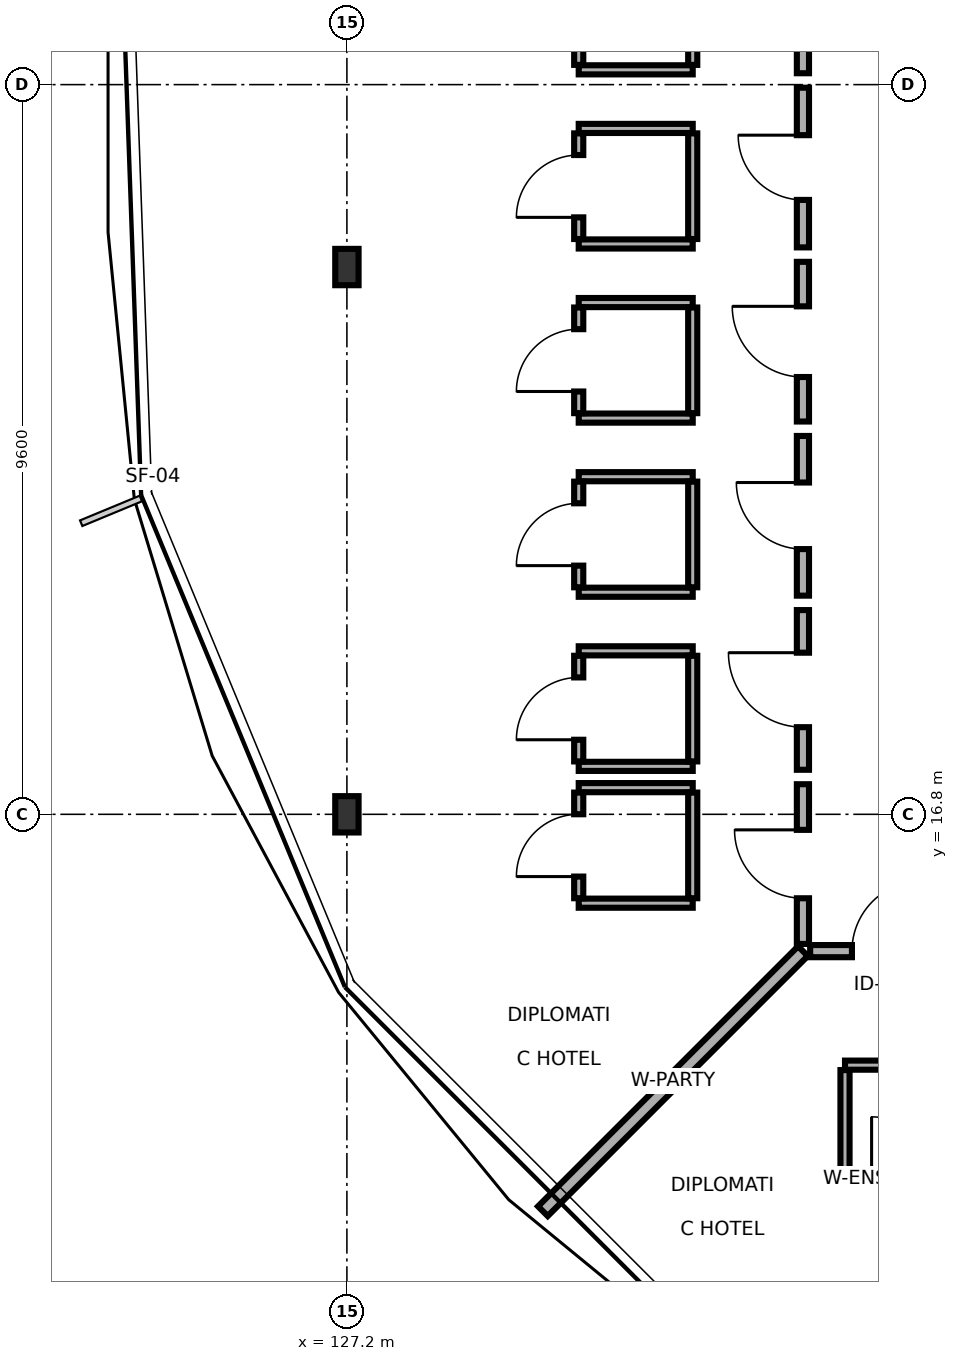
"""IFC4 building model, lengths in metres.
Left out: names, types, materials, properties, quantities, classifications, styles, units other than length and angle.
Written with IfcOpenShell. Run it as: python <this file> out.ifc"""

import sys

from ifc_helpers import new_model, si_unit, direction, frame, frame_2d, origin, origin_2d, place, context, subcontext, project, spatial, rectangle, i_section, extrude, element, fill, save


model = new_model("IFC4")
c1 = context("Model", 3, precision=1e-05, world=origin(), true_north=direction((0.0, 1.0)))
c2 = subcontext(c1, "Body", "Model", "MODEL_VIEW")
j1 = project(units=[si_unit("LENGTHUNIT", "METRE"), si_unit("PLANEANGLEUNIT", "RADIAN")], contexts=[c1])
p1 = place(None, origin())
s1 = spatial("IfcSite", under=j1, at=p1, CompositionType="ELEMENT")
p2 = place(p1, origin())
s2 = spatial("IfcBuilding", under=s1, at=p2, CompositionType="ELEMENT")
p3 = place(p2, frame((0.0, 0.0, 18.1)))
s3 = spatial("IfcBuildingStorey", under=s2, at=p3, CompositionType="ELEMENT", Elevation=18.1)
for number, where, z_axis, x_axis in (
    (1, (127.2, 24.0, 0.0), (0.0, 0.0, 1.0), (1.0, 0.0, 0.0)),
    (2, (127.2, 16.8, 0.0), (0.0, 0.0, 1.0), (1.0, 0.0, 0.0)),
):
    element("IfcColumn", number, at=place(p3, frame(where, z_axis=z_axis, x_axis=x_axis)), inside=s3, PredefinedType="COLUMN", context=c2, shape_type="SweptSolid", body=[
        extrude(i_section(OverallWidth=0.307, OverallDepth=0.478, WebThickness=0.021, FlangeThickness=0.04, FilletRadius=0.027, at=origin_2d()), origin(), (0.0, 0.0, 1.0), 3.4),
    ])
p4 = place(p3, frame((133.295, 15.0, 0.0), z_axis=(0.0, 0.0, 1.0), x_axis=(1.0, 0.0, 0.0)))
e3 = element("IfcWall", 3, at=p4, inside=s3, PredefinedType="PARTITIONING", context=c2, shape_type="SweptSolid", body=[
    extrude(rectangle(XDim=2.024, YDim=0.16, at=frame_2d((1.012, 0.0))), origin(), (0.0, 0.0, 1.0), 3.21),
])
p5 = place(p4, frame((0.55, 0.0, 0.0)))
e4 = element("IfcOpeningElement", 4, at=p5, cuts=e3, PredefinedType="OPENING", context=c2, shape_type="SweptSolid", body=[
    extrude(rectangle(XDim=0.924, YDim=2.16, at=frame_2d((0.462, 1.08))), frame((0.0, 0.09, 0.0), z_axis=(0.0, -1.0, 0.0), x_axis=(1.0, 0.0, 0.0)), (0.0, 0.0, 1.0), 0.18),
])
p6 = place(p3, frame((133.754, 12.0, 0.0), z_axis=(0.0, 0.0, 1.0), x_axis=(1.0, 0.0, 0.0)))
e5 = element("IfcWall", 5, at=p6, inside=s3, PredefinedType="PARTITIONING", context=c2, shape_type="SweptSolid", body=[
    extrude(rectangle(XDim=1.52, YDim=0.12, at=frame_2d((0.76, 0.0))), origin(), (0.0, 0.0, 1.0), 2.745),
])
p7 = place(p6, frame((0.35, 0.0, 0.0)))
e6 = element("IfcOpeningElement", 6, at=p7, cuts=e5, PredefinedType="OPENING", context=c2, shape_type="SweptSolid", body=[
    extrude(rectangle(XDim=0.82, YDim=2.08, at=frame_2d((0.41, 1.04))), frame((0.0, 0.07, 0.0), z_axis=(0.0, -1.0, 0.0), x_axis=(1.0, 0.0, 0.0)), (0.0, 0.0, 1.0), 0.14),
])
p8 = place(p3, frame((133.754, 13.5, 0.0), z_axis=(0.0, 0.0, 1.0), x_axis=(1.0, 0.0, 0.0)))
e7 = element("IfcWall", 7, at=p8, inside=s3, PredefinedType="PARTITIONING", context=c2, shape_type="SweptSolid", body=[
    extrude(rectangle(XDim=1.52, YDim=0.12, at=frame_2d((0.76, 0.0))), origin(), (0.0, 0.0, 1.0), 3.21),
])
p9 = place(p3, frame((133.754, 12.065, 0.0), z_axis=(0.0, 0.0, 1.0), x_axis=(0.0, 1.0, 0.0)))
e8 = element("IfcWall", 8, at=p9, inside=s3, PredefinedType="PARTITIONING", context=c2, shape_type="SweptSolid", body=[
    extrude(rectangle(XDim=1.37, YDim=0.12, at=frame_2d((0.685, 0.0))), origin(), (0.0, 0.0, 1.0), 3.21),
])
p10 = place(p3, frame((133.2, 15.0, 0.0), z_axis=(0.0, 0.0, 1.0), x_axis=(-0.707106781187, -0.707106781187, 0.0)))
e9 = element("IfcWall", 9, at=p10, inside=s3, PredefinedType="PARTITIONING", context=c2, shape_type="SweptSolid", body=[
    extrude(rectangle(XDim=4.839, YDim=0.18, at=frame_2d((2.419, 0.0))), origin(), (0.0, 0.0, 1.0), 2.755),
])
p11 = place(p3, frame((133.2, 26.55, 0.0), z_axis=(0.0, 0.0, 1.0), x_axis=(0.0, 1.0, 0.0)))
e10 = element("IfcWall", 10, at=p11, inside=s3, PredefinedType="PARTITIONING", context=c2, shape_type="SweptSolid", body=[
    extrude(rectangle(XDim=2.101, YDim=0.16, at=frame_2d((1.05, 0.0))), origin(), (0.0, 0.0, 1.0), 3.21),
])
p12 = place(p11, frame((0.61, 0.0, 0.0)))
e11 = element("IfcOpeningElement", 11, at=p12, cuts=e10, PredefinedType="OPENING", context=c2, shape_type="SweptSolid", body=[
    extrude(rectangle(XDim=0.88, YDim=2.05, at=frame_2d((0.44, 1.025))), frame((0.0, 0.09, 0.0), z_axis=(0.0, -1.0, 0.0), x_axis=(1.0, 0.0, 0.0)), (0.0, 0.0, 1.0), 0.18),
])
p13 = place(p3, frame((130.25, 26.594, 0.0), z_axis=(0.0, 0.0, 1.0), x_axis=(1.0, 0.0, 0.0)))
e12 = element("IfcWall", 12, at=p13, inside=s3, PredefinedType="PARTITIONING", context=c2, shape_type="SweptSolid", body=[
    extrude(rectangle(XDim=1.5, YDim=0.12, at=frame_2d((0.75, 0.0))), origin(), (0.0, 0.0, 1.0), 3.21),
])
p14 = place(p3, frame((130.25, 26.66, 0.0), z_axis=(0.0, 0.0, 1.0), x_axis=(0.0, 1.0, 0.0)))
e13 = element("IfcWall", 13, at=p14, inside=s3, PredefinedType="PARTITIONING", context=c2, shape_type="SweptSolid", body=[
    extrude(rectangle(XDim=1.39, YDim=0.12, at=frame_2d((0.695, 0.0))), origin(), (0.0, 0.0, 1.0), 3.21),
])
p15 = place(p14, frame((0.285, 0.0, 0.0)))
e14 = element("IfcOpeningElement", 14, at=p15, cuts=e13, PredefinedType="OPENING", context=c2, shape_type="SweptSolid", body=[
    extrude(rectangle(XDim=0.82, YDim=2.08, at=frame_2d((0.41, 1.04))), frame((0.0, 0.07, 0.0), z_axis=(0.0, -1.0, 0.0), x_axis=(1.0, 0.0, 0.0)), (0.0, 0.0, 1.0), 0.14),
])
p16 = place(p3, frame((131.75, 26.66, 0.0), z_axis=(0.0, 0.0, 1.0), x_axis=(0.0, 1.0, 0.0)))
e15 = element("IfcWall", 15, at=p16, inside=s3, PredefinedType="PARTITIONING", context=c2, shape_type="SweptSolid", body=[
    extrude(rectangle(XDim=1.39, YDim=0.12, at=frame_2d((0.695, 0.0))), origin(), (0.0, 0.0, 1.0), 3.21),
])
p17 = place(p3, frame((133.2, 24.259, 0.0), z_axis=(0.0, 0.0, 1.0), x_axis=(0.0, 1.0, 0.0)))
e16 = element("IfcWall", 16, at=p17, inside=s3, PredefinedType="PARTITIONING", context=c2, shape_type="SweptSolid", body=[
    extrude(rectangle(XDim=2.101, YDim=0.16, at=frame_2d((1.051, 0.0))), origin(), (0.0, 0.0, 1.0), 3.21),
])
p18 = place(p17, frame((0.625, 0.0, 0.0)))
e17 = element("IfcOpeningElement", 17, at=p18, cuts=e16, PredefinedType="OPENING", context=c2, shape_type="SweptSolid", body=[
    extrude(rectangle(XDim=0.852, YDim=2.1, at=frame_2d((0.426, 1.05))), frame((0.0, 0.09, 0.0), z_axis=(0.0, -1.0, 0.0), x_axis=(1.0, 0.0, 0.0)), (0.0, 0.0, 1.0), 0.18),
])
for number, where, z_axis, x_axis in (
    (18, (130.25, 24.304, 0.0), (0.0, 0.0, 1.0), (1.0, 0.0, 0.0)),
    (19, (130.25, 25.823, 0.0), (0.0, 0.0, 1.0), (1.0, 0.0, 0.0)),
):
    element("IfcWall", number, at=place(p3, frame(where, z_axis=z_axis, x_axis=x_axis)), inside=s3, PredefinedType="PARTITIONING", context=c2, shape_type="SweptSolid", body=[
        extrude(rectangle(XDim=1.5, YDim=0.12, at=frame_2d((0.75, 0.0))), origin(), (0.0, 0.0, 1.0), 3.21),
    ])
p19 = place(p3, frame((130.25, 24.369, 0.0), z_axis=(0.0, 0.0, 1.0), x_axis=(0.0, 1.0, 0.0)))
e20 = element("IfcWall", 20, at=p19, inside=s3, PredefinedType="PARTITIONING", context=c2, shape_type="SweptSolid", body=[
    extrude(rectangle(XDim=1.39, YDim=0.12, at=frame_2d((0.695, 0.0))), origin(), (0.0, 0.0, 1.0), 3.21),
])
p20 = place(p19, frame((0.285, 0.0, 0.0)))
e21 = element("IfcOpeningElement", 21, at=p20, cuts=e20, PredefinedType="OPENING", context=c2, shape_type="SweptSolid", body=[
    extrude(rectangle(XDim=0.82, YDim=2.08, at=frame_2d((0.41, 1.04))), frame((0.0, 0.07, 0.0), z_axis=(0.0, -1.0, 0.0), x_axis=(1.0, 0.0, 0.0)), (0.0, 0.0, 1.0), 0.14),
])
p21 = place(p3, frame((131.75, 24.369, 0.0), z_axis=(0.0, 0.0, 1.0), x_axis=(0.0, 1.0, 0.0)))
e22 = element("IfcWall", 22, at=p21, inside=s3, PredefinedType="PARTITIONING", context=c2, shape_type="SweptSolid", body=[
    extrude(rectangle(XDim=1.39, YDim=0.12, at=frame_2d((0.695, 0.0))), origin(), (0.0, 0.0, 1.0), 3.21),
])
p22 = place(p3, frame((133.2, 21.968, 0.0), z_axis=(0.0, 0.0, 1.0), x_axis=(0.0, 1.0, 0.0)))
e23 = element("IfcWall", 23, at=p22, inside=s3, PredefinedType="PARTITIONING", context=c2, shape_type="SweptSolid", body=[
    extrude(rectangle(XDim=2.101, YDim=0.16, at=frame_2d((1.05, 0.0))), origin(), (0.0, 0.0, 1.0), 2.745),
])
p23 = place(p22, frame((0.585, 0.0, 0.0)))
e24 = element("IfcOpeningElement", 24, at=p23, cuts=e23, PredefinedType="OPENING", context=c2, shape_type="SweptSolid", body=[
    extrude(rectangle(XDim=0.93, YDim=2.05, at=frame_2d((0.465, 1.025))), frame((0.0, 0.09, 0.0), z_axis=(0.0, -1.0, 0.0), x_axis=(1.0, 0.0, 0.0)), (0.0, 0.0, 1.0), 0.18),
])
for number, where, z_axis, x_axis in (
    (25, (130.25, 22.013, 0.0), (0.0, 0.0, 1.0), (1.0, 0.0, 0.0)),
    (26, (130.25, 23.533, 0.0), (0.0, 0.0, 1.0), (1.0, 0.0, 0.0)),
):
    element("IfcWall", number, at=place(p3, frame(where, z_axis=z_axis, x_axis=x_axis)), inside=s3, PredefinedType="PARTITIONING", context=c2, shape_type="SweptSolid", body=[
        extrude(rectangle(XDim=1.5, YDim=0.12, at=frame_2d((0.75, 0.0))), origin(), (0.0, 0.0, 1.0), 3.21),
    ])
p24 = place(p3, frame((130.25, 22.078, 0.0), z_axis=(0.0, 0.0, 1.0), x_axis=(0.0, 1.0, 0.0)))
e27 = element("IfcWall", 27, at=p24, inside=s3, PredefinedType="PARTITIONING", context=c2, shape_type="SweptSolid", body=[
    extrude(rectangle(XDim=1.39, YDim=0.12, at=frame_2d((0.695, 0.0))), origin(), (0.0, 0.0, 1.0), 3.21),
])
p25 = place(p24, frame((0.285, 0.0, 0.0)))
e28 = element("IfcOpeningElement", 28, at=p25, cuts=e27, PredefinedType="OPENING", context=c2, shape_type="SweptSolid", body=[
    extrude(rectangle(XDim=0.82, YDim=2.08, at=frame_2d((0.41, 1.04))), frame((0.0, 0.07, 0.0), z_axis=(0.0, -1.0, 0.0), x_axis=(1.0, 0.0, 0.0)), (0.0, 0.0, 1.0), 0.14),
])
p26 = place(p3, frame((131.75, 22.078, 0.0), z_axis=(0.0, 0.0, 1.0), x_axis=(0.0, 1.0, 0.0)))
e29 = element("IfcWall", 29, at=p26, inside=s3, PredefinedType="PARTITIONING", context=c2, shape_type="SweptSolid", body=[
    extrude(rectangle(XDim=1.39, YDim=0.12, at=frame_2d((0.695, 0.0))), origin(), (0.0, 0.0, 1.0), 3.21),
])
p27 = place(p3, frame((133.2, 19.677, 0.0), z_axis=(0.0, 0.0, 1.0), x_axis=(0.0, 1.0, 0.0)))
e30 = element("IfcWall", 30, at=p27, inside=s3, PredefinedType="PARTITIONING", context=c2, shape_type="SweptSolid", body=[
    extrude(rectangle(XDim=2.101, YDim=0.16, at=frame_2d((1.05, 0.0))), origin(), (0.0, 0.0, 1.0), 3.21),
])
p28 = place(p27, frame((0.612, 0.0, 0.0)))
e31 = element("IfcOpeningElement", 31, at=p28, cuts=e30, PredefinedType="OPENING", context=c2, shape_type="SweptSolid", body=[
    extrude(rectangle(XDim=0.876, YDim=2.16, at=frame_2d((0.438, 1.08))), frame((0.0, 0.09, 0.0), z_axis=(0.0, -1.0, 0.0), x_axis=(1.0, 0.0, 0.0)), (0.0, 0.0, 1.0), 0.18),
])
for number, where, z_axis, x_axis in (
    (32, (130.25, 19.722, 0.0), (0.0, 0.0, 1.0), (1.0, 0.0, 0.0)),
    (33, (130.25, 21.242, 0.0), (0.0, 0.0, 1.0), (1.0, 0.0, 0.0)),
):
    element("IfcWall", number, at=place(p3, frame(where, z_axis=z_axis, x_axis=x_axis)), inside=s3, PredefinedType="PARTITIONING", context=c2, shape_type="SweptSolid", body=[
        extrude(rectangle(XDim=1.5, YDim=0.12, at=frame_2d((0.75, 0.0))), origin(), (0.0, 0.0, 1.0), 3.21),
    ])
p29 = place(p3, frame((130.25, 19.787, 0.0), z_axis=(0.0, 0.0, 1.0), x_axis=(0.0, 1.0, 0.0)))
e34 = element("IfcWall", 34, at=p29, inside=s3, PredefinedType="PARTITIONING", context=c2, shape_type="SweptSolid", body=[
    extrude(rectangle(XDim=1.39, YDim=0.12, at=frame_2d((0.695, 0.0))), origin(), (0.0, 0.0, 1.0), 3.21),
])
p30 = place(p29, frame((0.285, 0.0, 0.0)))
e35 = element("IfcOpeningElement", 35, at=p30, cuts=e34, PredefinedType="OPENING", context=c2, shape_type="SweptSolid", body=[
    extrude(rectangle(XDim=0.82, YDim=2.08, at=frame_2d((0.41, 1.04))), frame((0.0, 0.07, 0.0), z_axis=(0.0, -1.0, 0.0), x_axis=(1.0, 0.0, 0.0)), (0.0, 0.0, 1.0), 0.14),
])
p31 = place(p3, frame((131.75, 19.787, 0.0), z_axis=(0.0, 0.0, 1.0), x_axis=(0.0, 1.0, 0.0)))
e36 = element("IfcWall", 36, at=p31, inside=s3, PredefinedType="PARTITIONING", context=c2, shape_type="SweptSolid", body=[
    extrude(rectangle(XDim=1.39, YDim=0.12, at=frame_2d((0.695, 0.0))), origin(), (0.0, 0.0, 1.0), 3.21),
])
p32 = place(p3, frame((133.2, 17.386, 0.0), z_axis=(0.0, 0.0, 1.0), x_axis=(0.0, 1.0, 0.0)))
e37 = element("IfcWall", 37, at=p32, inside=s3, PredefinedType="PARTITIONING", context=c2, shape_type="SweptSolid", body=[
    extrude(rectangle(XDim=2.101, YDim=0.16, at=frame_2d((1.05, 0.0))), origin(), (0.0, 0.0, 1.0), 3.21),
])
p33 = place(p32, frame((0.56, 0.0, 0.0)))
e38 = element("IfcOpeningElement", 38, at=p33, cuts=e37, PredefinedType="OPENING", context=c2, shape_type="SweptSolid", body=[
    extrude(rectangle(XDim=0.98, YDim=2.05, at=frame_2d((0.49, 1.025))), frame((0.0, 0.09, 0.0), z_axis=(0.0, -1.0, 0.0), x_axis=(1.0, 0.0, 0.0)), (0.0, 0.0, 1.0), 0.18),
])
for number, where, z_axis, x_axis in (
    (39, (130.25, 17.431, 0.0), (0.0, 0.0, 1.0), (1.0, 0.0, 0.0)),
    (40, (130.25, 18.951, 0.0), (0.0, 0.0, 1.0), (1.0, 0.0, 0.0)),
):
    element("IfcWall", number, at=place(p3, frame(where, z_axis=z_axis, x_axis=x_axis)), inside=s3, PredefinedType="PARTITIONING", context=c2, shape_type="SweptSolid", body=[
        extrude(rectangle(XDim=1.5, YDim=0.12, at=frame_2d((0.75, 0.0))), origin(), (0.0, 0.0, 1.0), 3.21),
    ])
p34 = place(p3, frame((130.25, 17.496, 0.0), z_axis=(0.0, 0.0, 1.0), x_axis=(0.0, 1.0, 0.0)))
e41 = element("IfcWall", 41, at=p34, inside=s3, PredefinedType="PARTITIONING", context=c2, shape_type="SweptSolid", body=[
    extrude(rectangle(XDim=1.39, YDim=0.12, at=frame_2d((0.695, 0.0))), origin(), (0.0, 0.0, 1.0), 3.21),
])
p35 = place(p34, frame((0.285, 0.0, 0.0)))
e42 = element("IfcOpeningElement", 42, at=p35, cuts=e41, PredefinedType="OPENING", context=c2, shape_type="SweptSolid", body=[
    extrude(rectangle(XDim=0.82, YDim=2.08, at=frame_2d((0.41, 1.04))), frame((0.0, 0.07, 0.0), z_axis=(0.0, -1.0, 0.0), x_axis=(1.0, 0.0, 0.0)), (0.0, 0.0, 1.0), 0.14),
])
p36 = place(p3, frame((131.75, 17.496, 0.0), z_axis=(0.0, 0.0, 1.0), x_axis=(0.0, 1.0, 0.0)))
e43 = element("IfcWall", 43, at=p36, inside=s3, PredefinedType="PARTITIONING", context=c2, shape_type="SweptSolid", body=[
    extrude(rectangle(XDim=1.39, YDim=0.12, at=frame_2d((0.695, 0.0))), origin(), (0.0, 0.0, 1.0), 3.21),
])
p37 = place(p3, frame((133.2, 15.095, 0.0), z_axis=(0.0, 0.0, 1.0), x_axis=(0.0, 1.0, 0.0)))
e44 = element("IfcWall", 44, at=p37, inside=s3, PredefinedType="PARTITIONING", context=c2, shape_type="SweptSolid", body=[
    extrude(rectangle(XDim=2.101, YDim=0.16, at=frame_2d((1.05, 0.0))), origin(), (0.0, 0.0, 1.0), 2.745),
])
p38 = place(p37, frame((0.601, 0.0, 0.0)))
e45 = element("IfcOpeningElement", 45, at=p38, cuts=e44, PredefinedType="OPENING", context=c2, shape_type="SweptSolid", body=[
    extrude(rectangle(XDim=0.9, YDim=2.1, at=frame_2d((0.45, 1.05))), frame((0.0, 0.09, 0.0), z_axis=(0.0, -1.0, 0.0), x_axis=(1.0, 0.0, 0.0)), (0.0, 0.0, 1.0), 0.18),
])
for number, where, z_axis, x_axis in (
    (46, (130.25, 15.631, 0.0), (0.0, 0.0, 1.0), (1.0, 0.0, 0.0)),
    (47, (130.25, 17.151, 0.0), (0.0, 0.0, 1.0), (1.0, 0.0, 0.0)),
):
    element("IfcWall", number, at=place(p3, frame(where, z_axis=z_axis, x_axis=x_axis)), inside=s3, PredefinedType="PARTITIONING", context=c2, shape_type="SweptSolid", body=[
        extrude(rectangle(XDim=1.5, YDim=0.12, at=frame_2d((0.75, 0.0))), origin(), (0.0, 0.0, 1.0), 3.21),
    ])
p39 = place(p3, frame((130.25, 15.696, 0.0), z_axis=(0.0, 0.0, 1.0), x_axis=(0.0, 1.0, 0.0)))
e48 = element("IfcWall", 48, at=p39, inside=s3, PredefinedType="PARTITIONING", context=c2, shape_type="SweptSolid", body=[
    extrude(rectangle(XDim=1.39, YDim=0.12, at=frame_2d((0.695, 0.0))), origin(), (0.0, 0.0, 1.0), 2.745),
])
p40 = place(p39, frame((0.285, 0.0, 0.0)))
e49 = element("IfcOpeningElement", 49, at=p40, cuts=e48, PredefinedType="OPENING", context=c2, shape_type="SweptSolid", body=[
    extrude(rectangle(XDim=0.82, YDim=2.08, at=frame_2d((0.41, 1.04))), frame((0.0, 0.07, 0.0), z_axis=(0.0, -1.0, 0.0), x_axis=(1.0, 0.0, 0.0)), (0.0, 0.0, 1.0), 0.14),
])
p41 = place(p3, frame((131.75, 15.696, 0.0), z_axis=(0.0, 0.0, 1.0), x_axis=(0.0, 1.0, 0.0)))
e50 = element("IfcWall", 50, at=p41, inside=s3, PredefinedType="PARTITIONING", context=c2, shape_type="SweptSolid", body=[
    extrude(rectangle(XDim=1.39, YDim=0.12, at=frame_2d((0.695, 0.0))), origin(), (0.0, 0.0, 1.0), 2.745),
])
p42 = place(p5, origin())
e51 = element("IfcDoor", 51, at=p42, inside=s3, OperationType="SINGLE_SWING_RIGHT", PredefinedType="DOOR", context=c2, shape_type="SweptSolid", body=[
    extrude(rectangle(XDim=0.924, YDim=2.16, at=frame_2d((0.462, 1.08))), frame((0.0, 0.025, 0.0), z_axis=(0.0, -1.0, 0.0), x_axis=(1.0, 0.0, 0.0)), (0.0, 0.0, 1.0), 0.05),
])
fill(e4, e51)
p43 = place(p7, origin())
e52 = element("IfcDoor", 52, at=p43, inside=s3, OperationType="SINGLE_SWING_LEFT", PredefinedType="DOOR", context=c2, shape_type="SweptSolid", body=[
    extrude(rectangle(XDim=0.82, YDim=2.08, at=frame_2d((0.41, 1.04))), frame((0.0, 0.025, 0.0), z_axis=(0.0, -1.0, 0.0), x_axis=(1.0, 0.0, 0.0)), (0.0, 0.0, 1.0), 0.05),
])
fill(e6, e52)
p44 = place(p18, origin())
e53 = element("IfcDoor", 53, at=p44, inside=s3, OperationType="SINGLE_SWING_RIGHT", PredefinedType="DOOR", context=c2, shape_type="SweptSolid", body=[
    extrude(rectangle(XDim=0.852, YDim=2.1, at=frame_2d((0.426, 1.05))), frame((0.0, 0.025, 0.0), z_axis=(0.0, -1.0, 0.0), x_axis=(1.0, 0.0, 0.0)), (0.0, 0.0, 1.0), 0.05),
])
fill(e17, e53)
p45 = place(p20, origin())
e54 = element("IfcDoor", 54, at=p45, inside=s3, OperationType="SINGLE_SWING_LEFT", PredefinedType="DOOR", context=c2, shape_type="SweptSolid", body=[
    extrude(rectangle(XDim=0.82, YDim=2.08, at=frame_2d((0.41, 1.04))), frame((0.0, 0.025, 0.0), z_axis=(0.0, -1.0, 0.0), x_axis=(1.0, 0.0, 0.0)), (0.0, 0.0, 1.0), 0.05),
])
fill(e21, e54)
p46 = place(p23, origin())
e55 = element("IfcDoor", 55, at=p46, inside=s3, OperationType="SINGLE_SWING_RIGHT", PredefinedType="DOOR", context=c2, shape_type="SweptSolid", body=[
    extrude(rectangle(XDim=0.93, YDim=2.05, at=frame_2d((0.465, 1.025))), frame((0.0, 0.025, 0.0), z_axis=(0.0, -1.0, 0.0), x_axis=(1.0, 0.0, 0.0)), (0.0, 0.0, 1.0), 0.05),
])
fill(e24, e55)
p47 = place(p25, origin())
e56 = element("IfcDoor", 56, at=p47, inside=s3, OperationType="SINGLE_SWING_LEFT", PredefinedType="DOOR", context=c2, shape_type="SweptSolid", body=[
    extrude(rectangle(XDim=0.82, YDim=2.08, at=frame_2d((0.41, 1.04))), frame((0.0, 0.025, 0.0), z_axis=(0.0, -1.0, 0.0), x_axis=(1.0, 0.0, 0.0)), (0.0, 0.0, 1.0), 0.05),
])
fill(e28, e56)
p48 = place(p28, origin())
e57 = element("IfcDoor", 57, at=p48, inside=s3, OperationType="SINGLE_SWING_RIGHT", PredefinedType="DOOR", context=c2, shape_type="SweptSolid", body=[
    extrude(rectangle(XDim=0.876, YDim=2.16, at=frame_2d((0.438, 1.08))), frame((0.0, 0.025, 0.0), z_axis=(0.0, -1.0, 0.0), x_axis=(1.0, 0.0, 0.0)), (0.0, 0.0, 1.0), 0.05),
])
fill(e31, e57)
p49 = place(p30, origin())
e58 = element("IfcDoor", 58, at=p49, inside=s3, OperationType="SINGLE_SWING_LEFT", PredefinedType="DOOR", context=c2, shape_type="SweptSolid", body=[
    extrude(rectangle(XDim=0.82, YDim=2.08, at=frame_2d((0.41, 1.04))), frame((0.0, 0.025, 0.0), z_axis=(0.0, -1.0, 0.0), x_axis=(1.0, 0.0, 0.0)), (0.0, 0.0, 1.0), 0.05),
])
fill(e35, e58)
p50 = place(p33, origin())
e59 = element("IfcDoor", 59, at=p50, inside=s3, OperationType="SINGLE_SWING_RIGHT", PredefinedType="DOOR", context=c2, shape_type="SweptSolid", body=[
    extrude(rectangle(XDim=0.98, YDim=2.05, at=frame_2d((0.49, 1.025))), frame((0.0, 0.025, 0.0), z_axis=(0.0, -1.0, 0.0), x_axis=(1.0, 0.0, 0.0)), (0.0, 0.0, 1.0), 0.05),
])
fill(e38, e59)
p51 = place(p35, origin())
e60 = element("IfcDoor", 60, at=p51, inside=s3, OperationType="SINGLE_SWING_LEFT", PredefinedType="DOOR", context=c2, shape_type="SweptSolid", body=[
    extrude(rectangle(XDim=0.82, YDim=2.08, at=frame_2d((0.41, 1.04))), frame((0.0, 0.025, 0.0), z_axis=(0.0, -1.0, 0.0), x_axis=(1.0, 0.0, 0.0)), (0.0, 0.0, 1.0), 0.05),
])
fill(e42, e60)
p52 = place(p38, origin())
e61 = element("IfcDoor", 61, at=p52, inside=s3, OperationType="SINGLE_SWING_RIGHT", PredefinedType="DOOR", context=c2, shape_type="SweptSolid", body=[
    extrude(rectangle(XDim=0.9, YDim=2.1, at=frame_2d((0.45, 1.05))), frame((0.0, 0.025, 0.0), z_axis=(0.0, -1.0, 0.0), x_axis=(1.0, 0.0, 0.0)), (0.0, 0.0, 1.0), 0.05),
])
fill(e45, e61)
p53 = place(p40, origin())
e62 = element("IfcDoor", 62, at=p53, inside=s3, OperationType="SINGLE_SWING_LEFT", PredefinedType="DOOR", context=c2, shape_type="SweptSolid", body=[
    extrude(rectangle(XDim=0.82, YDim=2.08, at=frame_2d((0.41, 1.04))), frame((0.0, 0.025, 0.0), z_axis=(0.0, -1.0, 0.0), x_axis=(1.0, 0.0, 0.0)), (0.0, 0.0, 1.0), 0.05),
])
fill(e49, e62)
save(model, sys.argv[1])
